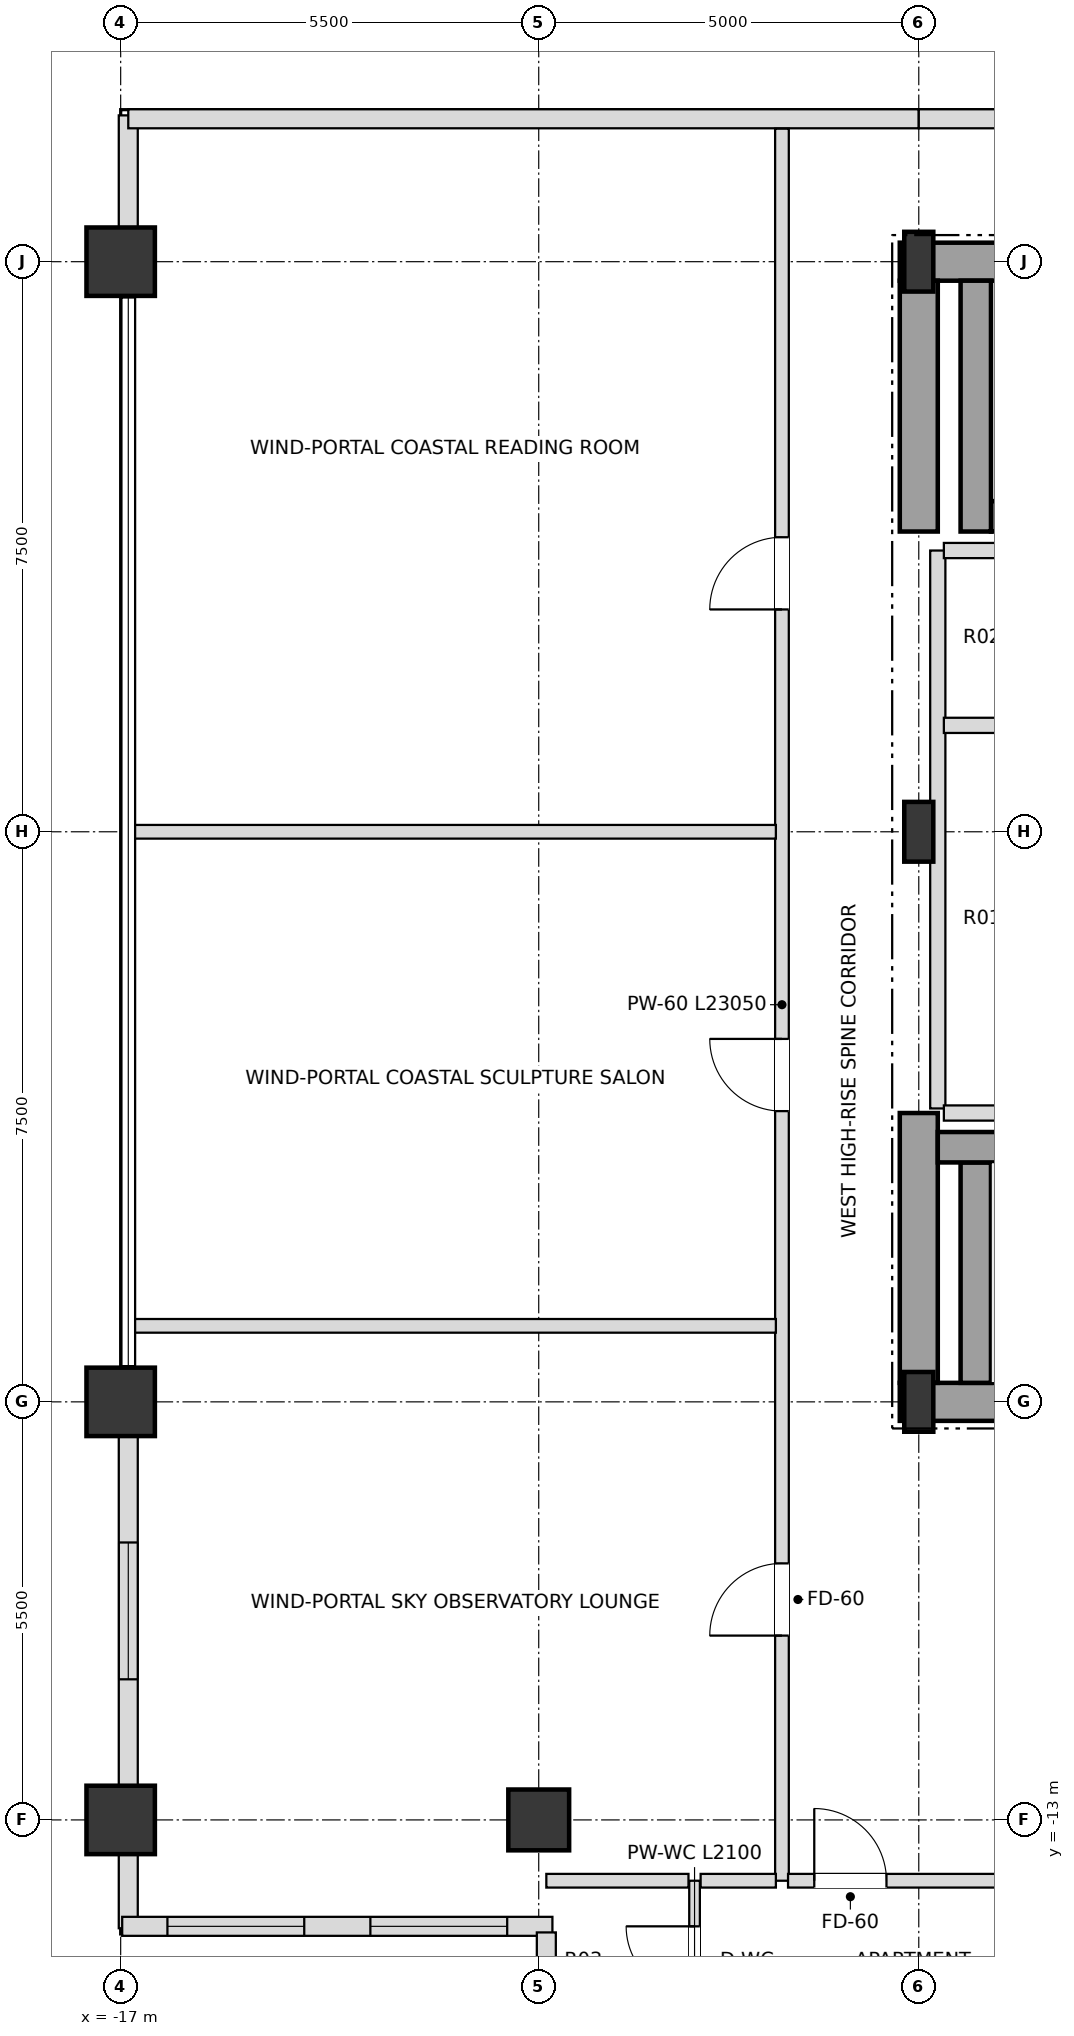
"""IFC4 building model, lengths in metres.
Left out: names, types, materials, properties, quantities, classifications, styles, units other than length and angle.
Written with IfcOpenShell. Run it as: python <this file> out.ifc"""

import sys

from ifc_helpers import new_model, si_unit, direction, frame, frame_2d, origin, origin_2d, place, context, subcontext, project, spatial, rectangle, i_section, extrude, element, fill, save


model = new_model("IFC4")
c1 = context("Model", 3, precision=1e-05, world=origin(), true_north=direction((0.0, 1.0)))
c2 = subcontext(c1, "Body", "Model", "MODEL_VIEW")
j1 = project(units=[si_unit("LENGTHUNIT", "METRE"), si_unit("PLANEANGLEUNIT", "RADIAN")], contexts=[c1])
p1 = place(None, origin())
s1 = spatial("IfcSite", under=j1, at=p1, CompositionType="ELEMENT")
p2 = place(p1, origin())
s2 = spatial("IfcBuilding", under=s1, at=p2, CompositionType="ELEMENT")
p3 = place(p2, frame((0.0, 0.0, 265.5)))
s3 = spatial("IfcBuildingStorey", under=s2, at=p3, CompositionType="ELEMENT", Elevation=265.5)
for number, where, z_axis, x_axis in (
    (1, (-6.5, -7.5, 0.0), (0.0, 0.0, 1.0), (1.0, 0.0, 0.0)),
    (2, (-6.5, 0.0, 0.0), (0.0, 0.0, 1.0), (1.0, 0.0, 0.0)),
    (3, (-6.5, 7.5, 0.0), (0.0, 0.0, 1.0), (1.0, 0.0, 0.0)),
):
    element("IfcColumn", number, at=place(p3, frame(where, z_axis=z_axis, x_axis=x_axis)), inside=s3, PredefinedType="COLUMN", context=c2, shape_type="SweptSolid", body=[
        extrude(i_section(OverallWidth=0.382, OverallDepth=0.786, WebThickness=0.02, FlangeThickness=0.033, at=origin_2d()), origin(), (0.0, 0.0, 1.0), 3.6),
    ])
for number, where, z_axis, x_axis in (
    (4, (-17.0, 7.5, 0.0), (0.0, 0.0, 1.0), (1.0, 0.0, 0.0)),
    (5, (-17.0, -7.5, 0.0), (0.0, 0.0, 1.0), (1.0, 0.0, 0.0)),
    (6, (-17.0, -13.0, 0.0), (0.0, 0.0, 1.0), (1.0, 0.0, 0.0)),
):
    element("IfcColumn", number, at=place(p3, frame(where, z_axis=z_axis, x_axis=x_axis)), inside=s3, PredefinedType="USERDEFINED", context=c2, shape_type="SweptSolid", body=[
        extrude(rectangle(XDim=0.9, YDim=0.9, at=origin_2d()), origin(), (0.0, 0.0, 1.0), 3.6),
    ])
p4 = place(p3, frame((-11.5, -13.0, 0.0), z_axis=(0.0, 0.0, 1.0), x_axis=(1.0, 0.0, 0.0)))
e7 = element("IfcColumn", 7, at=p4, inside=s3, PredefinedType="COLUMN", context=c2, shape_type="SweptSolid", body=[
    extrude(rectangle(XDim=0.8, YDim=0.8, at=origin_2d()), origin(), (0.0, 0.0, 1.0), 3.6),
])
p5 = place(p3, frame((-16.9, 9.425, 0.0), z_axis=(0.0, 0.0, 1.0), x_axis=(0.0, -1.0, 0.0)))
e8 = element("IfcWall", 8, at=p5, inside=s3, PredefinedType="SOLIDWALL", context=c2, shape_type="SweptSolid", body=[
    extrude(rectangle(XDim=1.48, YDim=0.25, at=frame_2d((0.74, 0.0))), origin(), (0.0, 0.0, 1.0), 2.748),
])
p6 = place(p3, frame((-16.9, -7.945, 0.0), z_axis=(0.0, 0.0, 1.0), x_axis=(0.0, -1.0, 0.0)))
e9 = element("IfcWall", 9, at=p6, inside=s3, PredefinedType="SOLIDWALL", context=c2, shape_type="SweptSolid", body=[
    extrude(rectangle(XDim=4.61, YDim=0.25, at=frame_2d((2.305, 0.0))), origin(), (0.0, 0.0, 1.0), 2.748),
])
p7 = place(p6, frame((1.405, 0.0, 0.72)))
e10 = element("IfcOpeningElement", 10, at=p7, cuts=e9, PredefinedType="OPENING", context=c2, shape_type="SweptSolid", body=[
    extrude(rectangle(XDim=1.8, YDim=1.68, at=frame_2d((0.9, 0.84))), frame((0.0, 0.135, 0.0), z_axis=(0.0, -1.0, 0.0), x_axis=(1.0, 0.0, 0.0)), (0.0, 0.0, 1.0), 0.27),
])
p8 = place(p3, frame((-16.9, -13.445, 0.0), z_axis=(0.0, 0.0, 1.0), x_axis=(0.0, -1.0, 0.0)))
e11 = element("IfcWall", 11, at=p8, inside=s3, PredefinedType="SOLIDWALL", context=c2, shape_type="SweptSolid", body=[
    extrude(rectangle(XDim=0.98, YDim=0.25, at=frame_2d((0.49, 0.0))), origin(), (0.0, 0.0, 1.0), 2.748),
])
p9 = place(p3, frame((-16.9, 9.38, 0.0), z_axis=(0.0, 0.0, 1.0), x_axis=(1.0, 0.0, 0.0)))
e12 = element("IfcWall", 12, at=p9, inside=s3, PredefinedType="SOLIDWALL", context=c2, shape_type="SweptSolid", body=[
    extrude(rectangle(XDim=10.4, YDim=0.25, at=frame_2d((5.2, 0.0))), origin(), (0.0, 0.0, 1.0), 2.826),
])
p10 = place(p3, frame((-6.5, 9.38, 0.0), z_axis=(0.0, 0.0, 1.0), x_axis=(1.0, 0.0, 0.0)))
e13 = element("IfcWall", 13, at=p10, inside=s3, PredefinedType="SOLIDWALL", context=c2, shape_type="SweptSolid", body=[
    extrude(rectangle(XDim=13.0, YDim=0.25, at=frame_2d((6.5, 0.0))), origin(), (0.0, 0.0, 1.0), 2.826),
])
p11 = place(p3, frame((-16.98, -14.4, 0.0), z_axis=(0.0, 0.0, 1.0), x_axis=(1.0, 0.0, 0.0)))
e14 = element("IfcWall", 14, at=p11, inside=s3, PredefinedType="SOLIDWALL", context=c2, shape_type="SweptSolid", body=[
    extrude(rectangle(XDim=5.66, YDim=0.25, at=frame_2d((2.83, 0.0))), origin(), (0.0, 0.0, 1.0), 2.748),
])
p12 = place(p11, frame((0.595, 0.0, 0.72)))
e15 = element("IfcOpeningElement", 15, at=p12, cuts=e14, PredefinedType="OPENING", context=c2, shape_type="SweptSolid", body=[
    extrude(rectangle(XDim=1.8, YDim=1.68, at=frame_2d((0.9, 0.84))), frame((0.0, 0.135, 0.0), z_axis=(0.0, -1.0, 0.0), x_axis=(1.0, 0.0, 0.0)), (0.0, 0.0, 1.0), 0.27),
])
p13 = place(p11, frame((3.265, 0.0, 0.72)))
e16 = element("IfcOpeningElement", 16, at=p13, cuts=e14, PredefinedType="OPENING", context=c2, shape_type="SweptSolid", body=[
    extrude(rectangle(XDim=1.8, YDim=1.68, at=frame_2d((0.9, 0.84))), frame((0.0, 0.135, 0.0), z_axis=(0.0, -1.0, 0.0), x_axis=(1.0, 0.0, 0.0)), (0.0, 0.0, 1.0), 0.27),
])
p14 = place(p3, frame((-11.4, -14.48, 0.0), z_axis=(0.0, 0.0, 1.0), x_axis=(0.0, -1.0, 0.0)))
e17 = element("IfcWall", 17, at=p14, inside=s3, PredefinedType="SOLIDWALL", context=c2, shape_type="SweptSolid", body=[
    extrude(rectangle(XDim=5.34, YDim=0.25, at=frame_2d((2.67, 0.0))), origin(), (0.0, 0.0, 1.0), 2.748),
])
p15 = place(p14, frame((0.33, 0.0, 0.72)))
e18 = element("IfcOpeningElement", 18, at=p15, cuts=e17, PredefinedType="OPENING", context=c2, shape_type="SweptSolid", body=[
    extrude(rectangle(XDim=0.76, YDim=1.68, at=frame_2d((0.38, 0.84))), frame((0.0, 0.135, 0.0), z_axis=(0.0, -1.0, 0.0), x_axis=(1.0, 0.0, 0.0)), (0.0, 0.0, 1.0), 0.27),
])
p16 = place(p14, frame((2.325, 0.0, 0.72)))
e19 = element("IfcOpeningElement", 19, at=p16, cuts=e17, PredefinedType="OPENING", context=c2, shape_type="SweptSolid", body=[
    extrude(rectangle(XDim=1.8, YDim=1.68, at=frame_2d((0.9, 0.84))), frame((0.0, 0.135, 0.0), z_axis=(0.0, -1.0, 0.0), x_axis=(1.0, 0.0, 0.0)), (0.0, 0.0, 1.0), 0.27),
])
p17 = place(p3, frame((-6.75, -7.5, 0.0), z_axis=(0.0, 0.0, 1.0), x_axis=(1.0, 0.0, 0.0)))
e20 = element("IfcWall", 20, at=p17, inside=s3, PredefinedType="SHEAR", context=c2, shape_type="SweptSolid", body=[
    extrude(rectangle(XDim=6.75, YDim=0.5, at=frame_2d((3.375, 0.0))), origin(), (0.0, 0.0, 1.0), 3.38),
])
p18 = place(p3, frame((-6.75, 7.5, 0.0), z_axis=(0.0, 0.0, 1.0), x_axis=(1.0, 0.0, 0.0)))
e21 = element("IfcWall", 21, at=p18, inside=s3, PredefinedType="SHEAR", context=c2, shape_type="SweptSolid", body=[
    extrude(rectangle(XDim=6.75, YDim=0.5, at=frame_2d((3.375, 0.0))), origin(), (0.0, 0.0, 1.0), 3.38),
])
p19 = place(p18, frame((1.65, 0.0, 0.0)))
e22 = element("IfcOpeningElement", 22, at=p19, cuts=e21, PredefinedType="OPENING", context=c2, shape_type="SweptSolid", body=[
    extrude(rectangle(XDim=1.05, YDim=2.15, at=frame_2d((0.525, 1.075))), frame((0.0, 0.26, 0.0), z_axis=(0.0, -1.0, 0.0), x_axis=(1.0, 0.0, 0.0)), (0.0, 0.0, 1.0), 0.52),
])
p20 = place(p3, frame((-6.5, -7.25, 0.0), z_axis=(0.0, 0.0, 1.0), x_axis=(0.0, 1.0, 0.0)))
e23 = element("IfcWall", 23, at=p20, inside=s3, PredefinedType="SHEAR", context=c2, shape_type="SweptSolid", body=[
    extrude(rectangle(XDim=3.55, YDim=0.5, at=frame_2d((1.775, 0.0))), origin(), (0.0, 0.0, 1.0), 3.38),
])
p21 = place(p3, frame((-6.5, 3.95, 0.0), z_axis=(0.0, 0.0, 1.0), x_axis=(0.0, 1.0, 0.0)))
e24 = element("IfcWall", 24, at=p21, inside=s3, PredefinedType="SHEAR", context=c2, shape_type="SweptSolid", body=[
    extrude(rectangle(XDim=3.3, YDim=0.5, at=frame_2d((1.65, 0.0))), origin(), (0.0, 0.0, 1.0), 3.38),
])
p22 = place(p3, frame((-5.75, -7.25, 0.0), z_axis=(0.0, 0.0, 1.0), x_axis=(0.0, 1.0, 0.0)))
e25 = element("IfcWall", 25, at=p22, inside=s3, PredefinedType="SHEAR", context=c2, shape_type="SweptSolid", body=[
    extrude(rectangle(XDim=2.9, YDim=0.4, at=frame_2d((1.45, 0.0))), origin(), (0.0, 0.0, 1.0), 3.38),
])
p23 = place(p3, frame((-6.25, -4.15, 0.0), z_axis=(0.0, 0.0, 1.0), x_axis=(1.0, 0.0, 0.0)))
e26 = element("IfcWall", 26, at=p23, inside=s3, PredefinedType="SHEAR", context=c2, shape_type="SweptSolid", body=[
    extrude(rectangle(XDim=7.78, YDim=0.4, at=frame_2d((3.89, 0.0))), origin(), (0.0, 0.0, 1.0), 3.38),
])
p24 = place(p3, frame((-5.55, 4.15, 0.0), z_axis=(0.0, 0.0, 1.0), x_axis=(1.0, 0.0, 0.0)))
e27 = element("IfcWall", 27, at=p24, inside=s3, PredefinedType="SHEAR", context=c2, shape_type="SweptSolid", body=[
    extrude(rectangle(XDim=7.08, YDim=0.4, at=frame_2d((3.54, 0.0))), origin(), (0.0, 0.0, 1.0), 3.38),
])
p25 = place(p3, frame((-5.75, 3.95, 0.0), z_axis=(0.0, 0.0, 1.0), x_axis=(0.0, 1.0, 0.0)))
e28 = element("IfcWall", 28, at=p25, inside=s3, PredefinedType="SHEAR", context=c2, shape_type="SweptSolid", body=[
    extrude(rectangle(XDim=3.3, YDim=0.4, at=frame_2d((1.65, 0.0))), origin(), (0.0, 0.0, 1.0), 3.38),
])
p26 = place(p3, frame((-9.45, -15.9, 0.0), z_axis=(0.0, 0.0, 1.0), x_axis=(0.0, 1.0, 0.0)))
e29 = element("IfcWall", 29, at=p26, inside=s3, PredefinedType="PARTITIONING", context=c2, shape_type="SweptSolid", body=[
    extrude(rectangle(XDim=2.1, YDim=0.14, at=frame_2d((1.05, 0.0))), origin(), (0.0, 0.0, 1.0), 3.38),
])
p27 = place(p26, frame((0.6, 0.0, 0.0)))
e30 = element("IfcOpeningElement", 30, at=p27, cuts=e29, PredefinedType="OPENING", context=c2, shape_type="SweptSolid", body=[
    extrude(rectangle(XDim=0.9, YDim=2.1, at=frame_2d((0.45, 1.05))), frame((0.0, 0.08, 0.0), z_axis=(0.0, -1.0, 0.0), x_axis=(1.0, 0.0, 0.0)), (0.0, 0.0, 1.0), 0.16),
])
p28 = place(p3, frame((-8.3, -13.8, 0.0), z_axis=(0.0, 0.0, 1.0), x_axis=(0.0, 1.0, 0.0)))
e31 = element("IfcWall", 31, at=p28, inside=s3, PredefinedType="PARTITIONING", context=c2, shape_type="SweptSolid", body=[
    extrude(rectangle(XDim=23.05, YDim=0.18, at=frame_2d((11.525, 0.0))), origin(), (0.0, 0.0, 1.0), 2.826),
])
p29 = place(p28, frame((3.225, 0.0, 0.0)))
e32 = element("IfcOpeningElement", 32, at=p29, cuts=e31, PredefinedType="OPENING", context=c2, shape_type="SweptSolid", body=[
    extrude(rectangle(XDim=0.95, YDim=2.15, at=frame_2d((0.475, 1.075))), frame((0.0, 0.1, 0.0), z_axis=(0.0, -1.0, 0.0), x_axis=(1.0, 0.0, 0.0)), (0.0, 0.0, 1.0), 0.2),
])
p30 = place(p28, frame((10.125, 0.0, 0.0)))
e33 = element("IfcOpeningElement", 33, at=p30, cuts=e31, PredefinedType="OPENING", context=c2, shape_type="SweptSolid", body=[
    extrude(rectangle(XDim=0.95, YDim=2.15, at=frame_2d((0.475, 1.075))), frame((0.0, 0.1, 0.0), z_axis=(0.0, -1.0, 0.0), x_axis=(1.0, 0.0, 0.0)), (0.0, 0.0, 1.0), 0.2),
])
p31 = place(p28, frame((16.725, 0.0, 0.0)))
e34 = element("IfcOpeningElement", 34, at=p31, cuts=e31, PredefinedType="OPENING", context=c2, shape_type="SweptSolid", body=[
    extrude(rectangle(XDim=0.95, YDim=2.15, at=frame_2d((0.475, 1.075))), frame((0.0, 0.1, 0.0), z_axis=(0.0, -1.0, 0.0), x_axis=(1.0, 0.0, 0.0)), (0.0, 0.0, 1.0), 0.2),
])
p32 = place(p3, frame((-6.25, -3.64, 0.0), z_axis=(0.0, 0.0, 1.0), x_axis=(0.0, 1.0, 0.0)))
e35 = element("IfcWall", 35, at=p32, inside=s3, PredefinedType="SOLIDWALL", context=c2, shape_type="SweptSolid", body=[
    extrude(rectangle(XDim=7.34, YDim=0.2, at=frame_2d((3.67, 0.0))), origin(), (0.0, 0.0, 1.0), 3.38),
])
p33 = place(p3, frame((-11.4, -13.8, 0.0), z_axis=(0.0, 0.0, 1.0), x_axis=(1.0, 0.0, 0.0)))
e36 = element("IfcWall", 36, at=p33, inside=s3, PredefinedType="PARTITIONING", context=c2, shape_type="SweptSolid", body=[
    extrude(rectangle(XDim=1.87, YDim=0.18, at=frame_2d((0.935, 0.0))), origin(), (0.0, 0.0, 1.0), 3.38),
])
p34 = place(p3, frame((-9.37, -13.8, 0.0), z_axis=(0.0, 0.0, 1.0), x_axis=(1.0, 0.0, 0.0)))
e37 = element("IfcWall", 37, at=p34, inside=s3, PredefinedType="PARTITIONING", context=c2, shape_type="SweptSolid", body=[
    extrude(rectangle(XDim=0.99, YDim=0.18, at=frame_2d((0.495, 0.0))), origin(), (0.0, 0.0, 1.0), 3.38),
])
p35 = place(p3, frame((-8.22, -13.8, 0.0), z_axis=(0.0, 0.0, 1.0), x_axis=(1.0, 0.0, 0.0)))
e38 = element("IfcWall", 38, at=p35, inside=s3, PredefinedType="PARTITIONING", context=c2, shape_type="SweptSolid", body=[
    extrude(rectangle(XDim=4.44, YDim=0.18, at=frame_2d((2.22, 0.0))), origin(), (0.0, 0.0, 1.0), 2.826),
])
p36 = place(p35, frame((0.345, 0.0, 0.0)))
e39 = element("IfcOpeningElement", 39, at=p36, cuts=e38, PredefinedType="OPENING", context=c2, shape_type="SweptSolid", body=[
    extrude(rectangle(XDim=0.95, YDim=2.15, at=frame_2d((0.475, 1.075))), frame((0.0, 0.1, 0.0), z_axis=(0.0, -1.0, 0.0), x_axis=(1.0, 0.0, 0.0)), (0.0, 0.0, 1.0), 0.2),
])
p37 = place(p3, frame((-16.82, -6.5, 0.0), z_axis=(0.0, 0.0, 1.0), x_axis=(1.0, 0.0, 0.0)))
e40 = element("IfcWall", 40, at=p37, inside=s3, PredefinedType="PARTITIONING", context=c2, shape_type="SweptSolid", body=[
    extrude(rectangle(XDim=8.44, YDim=0.18, at=frame_2d((4.22, 0.0))), origin(), (0.0, 0.0, 1.0), 3.018),
])
p38 = place(p3, frame((-6.17, -3.7, 0.0), z_axis=(0.0, 0.0, 1.0), x_axis=(1.0, 0.0, 0.0)))
e41 = element("IfcWall", 41, at=p38, inside=s3, PredefinedType="SOLIDWALL", context=c2, shape_type="SweptSolid", body=[
    extrude(rectangle(XDim=1.94, YDim=0.2, at=frame_2d((0.97, 0.0))), origin(), (0.0, 0.0, 1.0), 3.38),
])
p39 = place(p3, frame((-16.82, 0.0, 0.0), z_axis=(0.0, 0.0, 1.0), x_axis=(1.0, 0.0, 0.0)))
e42 = element("IfcWall", 42, at=p39, inside=s3, PredefinedType="PARTITIONING", context=c2, shape_type="SweptSolid", body=[
    extrude(rectangle(XDim=8.44, YDim=0.18, at=frame_2d((4.22, 0.0))), origin(), (0.0, 0.0, 1.0), 3.018),
])
for number, where, z_axis, x_axis in (
    (43, (-6.17, 1.4, 0.0), (0.0, 0.0, 1.0), (1.0, 0.0, 0.0)),
    (44, (-6.17, 3.7, 0.0), (0.0, 0.0, 1.0), (1.0, 0.0, 0.0)),
):
    element("IfcWall", number, at=place(p3, frame(where, z_axis=z_axis, x_axis=x_axis)), inside=s3, PredefinedType="SOLIDWALL", context=c2, shape_type="SweptSolid", body=[
        extrude(rectangle(XDim=1.94, YDim=0.2, at=frame_2d((0.97, 0.0))), origin(), (0.0, 0.0, 1.0), 3.38),
    ])
p40 = place(p7, origin())
e45 = element("IfcWindow", 45, at=p40, inside=s3, PartitioningType="SINGLE_PANEL", PredefinedType="WINDOW", context=c2, shape_type="SweptSolid", body=[
    extrude(rectangle(XDim=1.8, YDim=1.68, at=frame_2d((0.9, 0.84))), frame((0.0, 0.03, 0.0), z_axis=(0.0, -1.0, 0.0), x_axis=(1.0, 0.0, 0.0)), (0.0, 0.0, 1.0), 0.06),
])
fill(e10, e45)
p41 = place(p12, origin())
e46 = element("IfcWindow", 46, at=p41, inside=s3, PartitioningType="SINGLE_PANEL", PredefinedType="WINDOW", context=c2, shape_type="SweptSolid", body=[
    extrude(rectangle(XDim=1.8, YDim=1.68, at=frame_2d((0.9, 0.84))), frame((0.0, 0.03, 0.0), z_axis=(0.0, -1.0, 0.0), x_axis=(1.0, 0.0, 0.0)), (0.0, 0.0, 1.0), 0.06),
])
fill(e15, e46)
p42 = place(p13, origin())
e47 = element("IfcWindow", 47, at=p42, inside=s3, PartitioningType="SINGLE_PANEL", PredefinedType="WINDOW", context=c2, shape_type="SweptSolid", body=[
    extrude(rectangle(XDim=1.8, YDim=1.68, at=frame_2d((0.9, 0.84))), frame((0.0, 0.03, 0.0), z_axis=(0.0, -1.0, 0.0), x_axis=(1.0, 0.0, 0.0)), (0.0, 0.0, 1.0), 0.06),
])
fill(e16, e47)
p43 = place(p27, origin())
e48 = element("IfcDoor", 48, at=p43, inside=s3, OperationType="SINGLE_SWING_RIGHT", PredefinedType="DOOR", context=c2, shape_type="SweptSolid", body=[
    extrude(rectangle(XDim=0.9, YDim=2.1, at=frame_2d((0.45, 1.05))), frame((0.0, 0.025, 0.0), z_axis=(0.0, -1.0, 0.0), x_axis=(1.0, 0.0, 0.0)), (0.0, 0.0, 1.0), 0.05),
])
fill(e30, e48)
p44 = place(p36, origin())
e49 = element("IfcDoor", 49, at=p44, inside=s3, OperationType="SINGLE_SWING_LEFT", PredefinedType="DOOR", context=c2, shape_type="SweptSolid", body=[
    extrude(rectangle(XDim=0.95, YDim=2.15, at=frame_2d((0.475, 1.075))), frame((0.0, 0.025, 0.0), z_axis=(0.0, -1.0, 0.0), x_axis=(1.0, 0.0, 0.0)), (0.0, 0.0, 1.0), 0.05),
])
fill(e39, e49)
p45 = place(p29, origin())
e50 = element("IfcDoor", 50, at=p45, inside=s3, OperationType="SINGLE_SWING_LEFT", PredefinedType="DOOR", context=c2, shape_type="SweptSolid", body=[
    extrude(rectangle(XDim=0.95, YDim=2.15, at=frame_2d((0.475, 1.075))), frame((0.0, 0.025, 0.0), z_axis=(0.0, -1.0, 0.0), x_axis=(1.0, 0.0, 0.0)), (0.0, 0.0, 1.0), 0.05),
])
fill(e32, e50)
p46 = place(p30, origin())
e51 = element("IfcDoor", 51, at=p46, inside=s3, OperationType="SINGLE_SWING_RIGHT", PredefinedType="DOOR", context=c2, shape_type="SweptSolid", body=[
    extrude(rectangle(XDim=0.95, YDim=2.15, at=frame_2d((0.475, 1.075))), frame((0.0, 0.025, 0.0), z_axis=(0.0, -1.0, 0.0), x_axis=(1.0, 0.0, 0.0)), (0.0, 0.0, 1.0), 0.05),
])
fill(e33, e51)
p47 = place(p31, origin())
e52 = element("IfcDoor", 52, at=p47, inside=s3, OperationType="SINGLE_SWING_LEFT", PredefinedType="DOOR", context=c2, shape_type="SweptSolid", body=[
    extrude(rectangle(XDim=0.95, YDim=2.15, at=frame_2d((0.475, 1.075))), frame((0.0, 0.025, 0.0), z_axis=(0.0, -1.0, 0.0), x_axis=(1.0, 0.0, 0.0)), (0.0, 0.0, 1.0), 0.05),
])
fill(e34, e52)
save(model, sys.argv[1])
